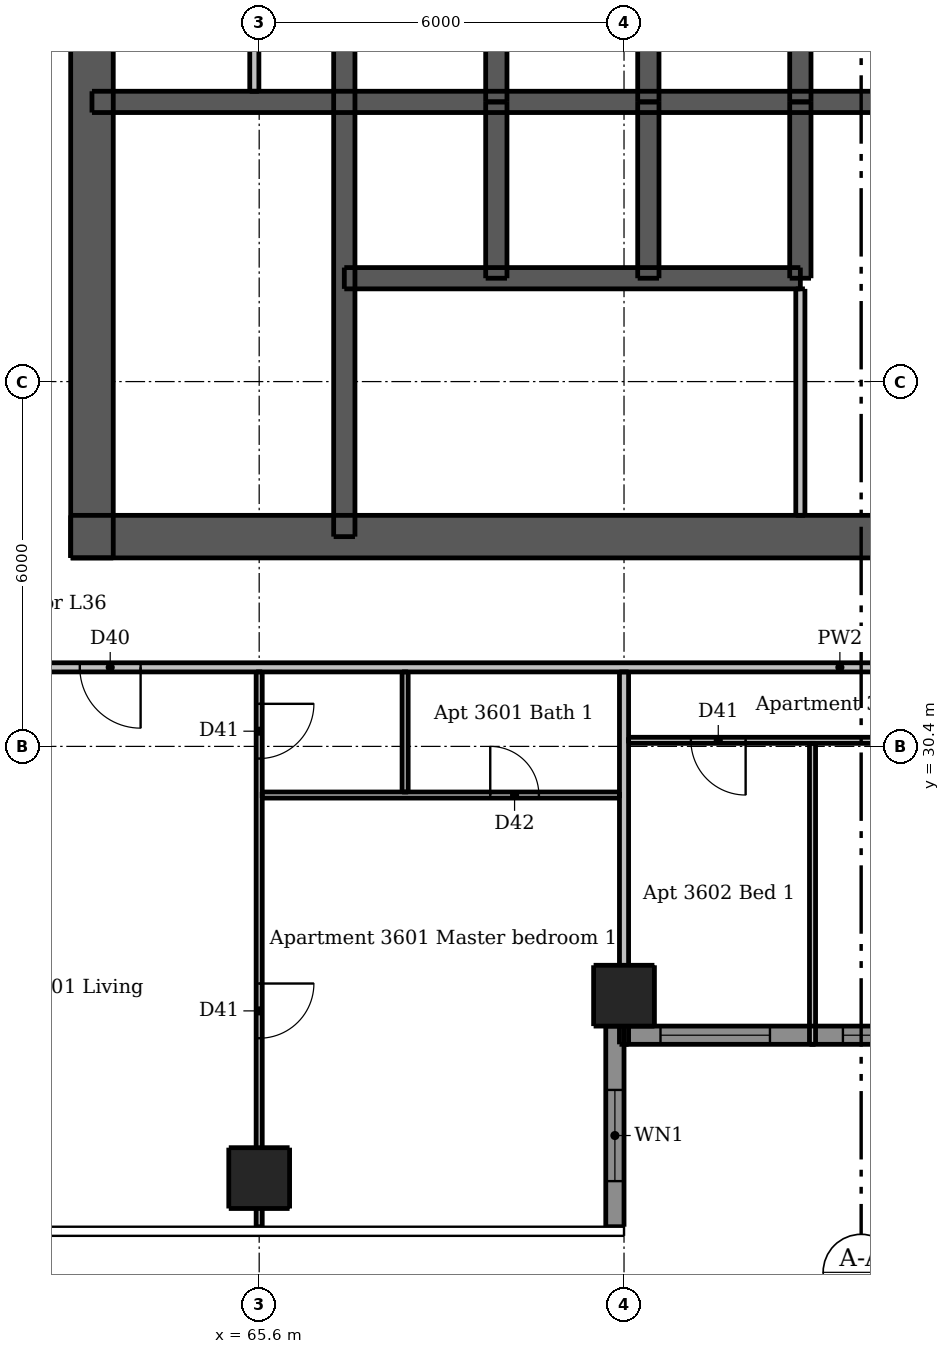
"""IFC4 building model, lengths in metres.
Left out: names, types, materials, properties, quantities, classifications, styles, units other than length and angle.
Written with IfcOpenShell. Run it as: python <this file> out.ifc"""

import sys

from ifc_helpers import new_model, si_unit, direction, frame, frame_2d, origin, origin_2d, place, context, subcontext, project, spatial, rectangle, extrude, element, fill, save


model = new_model("IFC4")
c1 = context("Model", 3, precision=1e-05, world=origin(), true_north=direction((0.0, 1.0)))
c2 = subcontext(c1, "Body", "Model", "MODEL_VIEW")
j1 = project(units=[si_unit("LENGTHUNIT", "METRE"), si_unit("PLANEANGLEUNIT", "RADIAN")], contexts=[c1])
p1 = place(None, origin())
s1 = spatial("IfcSite", under=j1, at=p1, CompositionType="ELEMENT")
p2 = place(p1, origin())
s2 = spatial("IfcBuilding", under=s1, at=p2, CompositionType="ELEMENT")
p3 = place(p2, frame((0.0, 0.0, 137.2)))
s3 = spatial("IfcBuildingStorey", under=s2, at=p3, CompositionType="ELEMENT", Elevation=137.2)
p4 = place(p3, frame((62.5, 33.85, 0.0), z_axis=(0.0, 0.0, 1.0), x_axis=(1.0, 0.0, 0.0)))
e1 = element("IfcWall", 1, at=p4, inside=s3, PredefinedType="SHEAR", context=c2, shape_type="SweptSolid", body=[
    extrude(rectangle(XDim=24.0, YDim=0.7, at=frame_2d((12.0, 0.0))), origin(), (0.0, 0.0, 1.0), 3.05),
])
p5 = place(p4, frame((1.962, 0.0, 0.0)))
e2 = element("IfcOpeningElement", 2, at=p5, cuts=e1, PredefinedType="OPENING", context=c2, shape_type="SweptSolid", body=[
    extrude(rectangle(XDim=1.1, YDim=2.1, at=frame_2d((0.55, 1.05))), frame((0.0, 0.36, 0.0), z_axis=(0.0, -1.0, 0.0), x_axis=(1.0, 0.0, 0.0)), (0.0, 0.0, 1.0), 0.72),
])
p6 = place(p4, frame((20.938, 0.0, 0.0)))
e3 = element("IfcOpeningElement", 3, at=p6, cuts=e1, PredefinedType="OPENING", context=c2, shape_type="SweptSolid", body=[
    extrude(rectangle(XDim=1.1, YDim=2.1, at=frame_2d((0.55, 1.05))), frame((0.0, 0.36, 0.0), z_axis=(0.0, -1.0, 0.0), x_axis=(1.0, 0.0, 0.0)), (0.0, 0.0, 1.0), 0.72),
])
p7 = place(p4, frame((8.0, 0.0, 0.0)))
e4 = element("IfcOpeningElement", 4, at=p7, cuts=e1, PredefinedType="OPENING", context=c2, shape_type="SweptSolid", body=[
    extrude(rectangle(XDim=1.1, YDim=2.1, at=frame_2d((0.55, 1.05))), frame((0.0, 0.36, 0.0), z_axis=(0.0, -1.0, 0.0), x_axis=(1.0, 0.0, 0.0)), (0.0, 0.0, 1.0), 0.72),
])
p8 = place(p4, frame((15.3, 0.0, 0.0)))
e5 = element("IfcOpeningElement", 5, at=p8, cuts=e1, PredefinedType="OPENING", context=c2, shape_type="SweptSolid", body=[
    extrude(rectangle(XDim=0.9, YDim=2.1, at=frame_2d((0.45, 1.05))), frame((0.0, 0.36, 0.0), z_axis=(0.0, -1.0, 0.0), x_axis=(1.0, 0.0, 0.0)), (0.0, 0.0, 1.0), 0.72),
])
p9 = place(p3, frame((62.85, 33.5, 0.0), z_axis=(0.0, 0.0, 1.0), x_axis=(0.0, 1.0, 0.0)))
e6 = element("IfcWall", 6, at=p9, inside=s3, PredefinedType="SHEAR", context=c2, shape_type="SweptSolid", body=[
    extrude(rectangle(XDim=24.0, YDim=0.7, at=frame_2d((12.0, 0.0))), origin(), (0.0, 0.0, 1.0), 3.05),
])
p10 = place(p9, frame((11.2, 0.0, 0.0)))
e7 = element("IfcOpeningElement", 7, at=p10, cuts=e6, PredefinedType="OPENING", context=c2, shape_type="SweptSolid", body=[
    extrude(rectangle(XDim=1.6, YDim=2.1, at=frame_2d((0.8, 1.05))), frame((0.0, 0.36, 0.0), z_axis=(0.0, -1.0, 0.0), x_axis=(1.0, 0.0, 0.0)), (0.0, 0.0, 1.0), 0.72),
])
p11 = place(p3, frame((62.85, 41.0, 0.0), z_axis=(0.0, 0.0, 1.0), x_axis=(1.0, 0.0, 0.0)))
e8 = element("IfcWall", 8, at=p11, inside=s3, PredefinedType="SHEAR", context=c2, shape_type="SweptSolid", body=[
    extrude(rectangle(XDim=23.3, YDim=0.35, at=frame_2d((11.65, 0.0))), origin(), (0.0, 0.0, 1.0), 3.05),
])
p12 = place(p3, frame((67.0, 33.85, 0.0), z_axis=(0.0, 0.0, 1.0), x_axis=(0.0, 1.0, 0.0)))
e9 = element("IfcWall", 9, at=p12, inside=s3, PredefinedType="SHEAR", context=c2, shape_type="SweptSolid", body=[
    extrude(rectangle(XDim=10.05, YDim=0.35, at=frame_2d((5.025, 0.0))), origin(), (0.0, 0.0, 1.0), 3.05),
])
p13 = place(p12, frame((0.55, 0.0, 0.0)))
e10 = element("IfcOpeningElement", 10, at=p13, cuts=e9, PredefinedType="OPENING", context=c2, shape_type="SweptSolid", body=[
    extrude(rectangle(XDim=1.1, YDim=2.1, at=frame_2d((0.55, 1.05))), frame((0.0, 0.185, 0.0), z_axis=(0.0, -1.0, 0.0), x_axis=(1.0, 0.0, 0.0)), (0.0, 0.0, 1.0), 0.37),
])
for number, where, z_axis, x_axis in (
    (11, (69.5, 41.0, 0.0), (0.0, 0.0, 1.0), (0.0, 1.0, 0.0)),
    (12, (72.0, 41.0, 0.0), (0.0, 0.0, 1.0), (0.0, 1.0, 0.0)),
    (13, (74.5, 41.0, 0.0), (0.0, 0.0, 1.0), (0.0, 1.0, 0.0)),
):
    element("IfcWall", number, at=place(p3, frame(where, z_axis=z_axis, x_axis=x_axis)), inside=s3, PredefinedType="SHEAR", context=c2, shape_type="SweptSolid", body=[
        extrude(rectangle(XDim=2.9, YDim=0.35, at=frame_2d((1.45, 0.0))), origin(), (0.0, 0.0, 1.0), 3.05),
    ])
p14 = place(p3, frame((67.0, 38.1, 0.0), z_axis=(0.0, 0.0, 1.0), x_axis=(1.0, 0.0, 0.0)))
e14 = element("IfcWall", 14, at=p14, inside=s3, PredefinedType="SHEAR", context=c2, shape_type="SweptSolid", body=[
    extrude(rectangle(XDim=7.5, YDim=0.35, at=frame_2d((3.75, 0.0))), origin(), (0.0, 0.0, 1.0), 3.05),
])
p15 = place(p14, frame((0.7, 0.0, 0.0)))
e15 = element("IfcOpeningElement", 15, at=p15, cuts=e14, PredefinedType="OPENING", context=c2, shape_type="SweptSolid", body=[
    extrude(rectangle(XDim=1.1, YDim=2.1, at=frame_2d((0.55, 1.05))), frame((0.0, 0.185, 0.0), z_axis=(0.0, -1.0, 0.0), x_axis=(1.0, 0.0, 0.0)), (0.0, 0.0, 1.0), 0.37),
])
p16 = place(p14, frame((3.2, 0.0, 0.0)))
e16 = element("IfcOpeningElement", 16, at=p16, cuts=e14, PredefinedType="OPENING", context=c2, shape_type="SweptSolid", body=[
    extrude(rectangle(XDim=1.1, YDim=2.1, at=frame_2d((0.55, 1.05))), frame((0.0, 0.185, 0.0), z_axis=(0.0, -1.0, 0.0), x_axis=(1.0, 0.0, 0.0)), (0.0, 0.0, 1.0), 0.37),
])
p17 = place(p14, frame((5.65, 0.0, 0.0)))
e17 = element("IfcOpeningElement", 17, at=p17, cuts=e14, PredefinedType="OPENING", context=c2, shape_type="SweptSolid", body=[
    extrude(rectangle(XDim=1.2, YDim=2.1, at=frame_2d((0.6, 1.05))), frame((0.0, 0.185, 0.0), z_axis=(0.0, -1.0, 0.0), x_axis=(1.0, 0.0, 0.0)), (0.0, 0.0, 1.0), 0.37),
])
for number, where, z_axis, x_axis in (
    (18, (69.5, 38.1, 0.0), (0.0, 0.0, 1.0), (0.0, 1.0, 0.0)),
    (19, (72.0, 38.1, 0.0), (0.0, 0.0, 1.0), (0.0, 1.0, 0.0)),
    (20, (74.5, 38.1, 0.0), (0.0, 0.0, 1.0), (0.0, 1.0, 0.0)),
):
    element("IfcWall", number, at=place(p3, frame(where, z_axis=z_axis, x_axis=x_axis)), inside=s3, PredefinedType="SHEAR", context=c2, shape_type="SweptSolid", body=[
        extrude(rectangle(XDim=2.9, YDim=0.35, at=frame_2d((1.45, 0.0))), origin(), (0.0, 0.0, 1.0), 3.05),
    ])
for number, where, z_axis, x_axis in (
    (21, (65.6, 23.3, 0.0), (0.0, 0.0, 1.0), (1.0, 0.0, 0.0)),
    (22, (71.6, 26.3, 0.0), (0.0, 0.0, 1.0), (1.0, 0.0, 0.0)),
):
    element("IfcColumn", number, at=place(p3, frame(where, z_axis=z_axis, x_axis=x_axis)), inside=s3, PredefinedType="COLUMN", context=c2, shape_type="SweptSolid", body=[
        extrude(rectangle(XDim=1.0, YDim=1.0, at=origin_2d()), origin(), (0.0, 0.0, 1.0), 3.05),
    ])
p18 = place(p3, frame((71.45, 22.5, 0.0), z_axis=(0.0, 0.0, 1.0), x_axis=(0.0, 1.0, 0.0)))
e23 = element("IfcWall", 23, at=p18, inside=s3, PredefinedType="SOLIDWALL", context=c2, shape_type="SweptSolid", body=[
    extrude(rectangle(XDim=3.3, YDim=0.3, at=frame_2d((1.65, 0.0))), origin(), (0.0, 0.0, 1.0), 3.05),
])
p19 = place(p18, frame((0.75, 0.0, 0.9)))
e24 = element("IfcOpeningElement", 24, at=p19, cuts=e23, PredefinedType="OPENING", context=c2, shape_type="SweptSolid", body=[
    extrude(rectangle(XDim=1.5, YDim=1.5, at=frame_2d((0.75, 0.75))), frame((0.0, 0.16, 0.0), z_axis=(0.0, -1.0, 0.0), x_axis=(1.0, 0.0, 0.0)), (0.0, 0.0, 1.0), 0.32),
])
p20 = place(p3, frame((71.6, 25.65, 0.0), z_axis=(0.0, 0.0, 1.0), x_axis=(1.0, 0.0, 0.0)))
e25 = element("IfcWall", 25, at=p20, inside=s3, PredefinedType="SOLIDWALL", context=c2, shape_type="SweptSolid", body=[
    extrude(rectangle(XDim=6.0, YDim=0.3, at=frame_2d((3.0, 0.0))), origin(), (0.0, 0.0, 1.0), 3.05),
])
p21 = place(p20, frame((0.6, 0.0, 0.15)))
e26 = element("IfcOpeningElement", 26, at=p21, cuts=e25, PredefinedType="OPENING", context=c2, shape_type="SweptSolid", body=[
    extrude(rectangle(XDim=1.8, YDim=2.1, at=frame_2d((0.9, 1.05))), frame((0.0, 0.16, 0.0), z_axis=(0.0, -1.0, 0.0), x_axis=(1.0, 0.0, 0.0)), (0.0, 0.0, 1.0), 0.32),
])
p22 = place(p20, frame((3.6, 0.0, 0.15)))
e27 = element("IfcOpeningElement", 27, at=p22, cuts=e25, PredefinedType="OPENING", context=c2, shape_type="SweptSolid", body=[
    extrude(rectangle(XDim=1.8, YDim=2.1, at=frame_2d((0.9, 1.05))), frame((0.0, 0.16, 0.0), z_axis=(0.0, -1.0, 0.0), x_axis=(1.0, 0.0, 0.0)), (0.0, 0.0, 1.0), 0.32),
])
p23 = place(p3, frame((74.5, 34.2, 0.0), z_axis=(0.0, 0.0, 1.0), x_axis=(0.0, 1.0, 0.0)))
e28 = element("IfcWall", 28, at=p23, inside=s3, PredefinedType="PLUMBINGWALL", context=c2, shape_type="SweptSolid", body=[
    extrude(rectangle(XDim=3.725, YDim=0.15, at=frame_2d((1.863, 0.0))), origin(), (0.0, 0.0, 1.0), 3.05),
])
p24 = place(p3, frame((65.52, 41.175, 0.0), z_axis=(0.0, 0.0, 1.0), x_axis=(0.0, 1.0, 0.0)))
e29 = element("IfcWall", 29, at=p24, inside=s3, PredefinedType="PLUMBINGWALL", context=c2, shape_type="SweptSolid", body=[
    extrude(rectangle(XDim=2.55, YDim=0.15, at=frame_2d((1.275, 0.0))), origin(), (0.0, 0.0, 1.0), 3.05),
])
p25 = place(p3, frame((65.6, 31.625, 0.0), z_axis=(0.0, 0.0, 1.0), x_axis=(0.0, -1.0, 0.0)))
e30 = element("IfcWall", 30, at=p25, inside=s3, PredefinedType="PARTITIONING", context=c2, shape_type="SweptSolid", body=[
    extrude(rectangle(XDim=9.125, YDim=0.1, at=frame_2d((4.562, 0.0))), origin(), (0.0, 0.0, 1.0), 2.516),
])
p26 = place(p25, frame((0.525, 0.0, 0.0)))
e31 = element("IfcOpeningElement", 31, at=p26, cuts=e30, PredefinedType="OPENING", context=c2, shape_type="SweptSolid", body=[
    extrude(rectangle(XDim=0.9, YDim=2.1, at=frame_2d((0.45, 1.05))), frame((0.0, 0.06, 0.0), z_axis=(0.0, -1.0, 0.0), x_axis=(1.0, 0.0, 0.0)), (0.0, 0.0, 1.0), 0.12),
])
p27 = place(p25, frame((5.125, 0.0, 0.0)))
e32 = element("IfcOpeningElement", 32, at=p27, cuts=e30, PredefinedType="OPENING", context=c2, shape_type="SweptSolid", body=[
    extrude(rectangle(XDim=0.9, YDim=2.1, at=frame_2d((0.45, 1.05))), frame((0.0, 0.06, 0.0), z_axis=(0.0, -1.0, 0.0), x_axis=(1.0, 0.0, 0.0)), (0.0, 0.0, 1.0), 0.12),
])
p28 = place(p3, frame((68.0, 29.65, 0.0), z_axis=(0.0, 0.0, 1.0), x_axis=(0.0, 1.0, 0.0)))
e33 = element("IfcWall", 33, at=p28, inside=s3, PredefinedType="PARTITIONING", context=c2, shape_type="SweptSolid", body=[
    extrude(rectangle(XDim=1.975, YDim=0.1, at=frame_2d((0.988, 0.0))), origin(), (0.0, 0.0, 1.0), 3.05),
])
p29 = place(p3, frame((74.7, 25.5, 0.0), z_axis=(0.0, 0.0, 1.0), x_axis=(0.0, 1.0, 0.0)))
e34 = element("IfcWall", 34, at=p29, inside=s3, PredefinedType="PARTITIONING", context=c2, shape_type="SweptSolid", body=[
    extrude(rectangle(XDim=4.95, YDim=0.1, at=frame_2d((2.475, 0.0))), origin(), (0.0, 0.0, 1.0), 3.05),
])
p30 = place(p3, frame((88.25, 30.5, 0.0), z_axis=(0.0, 0.0, 1.0), x_axis=(-1.0, 0.0, 0.0)))
e35 = element("IfcWall", 35, at=p30, inside=s3, PredefinedType="PARTITIONING", context=c2, shape_type="SweptSolid", body=[
    extrude(rectangle(XDim=16.575, YDim=0.1, at=frame_2d((8.288, 0.0))), origin(), (0.0, 0.0, 1.0), 3.05),
])
p31 = place(p30, frame((4.2, 0.0, 0.0)))
e36 = element("IfcOpeningElement", 36, at=p31, cuts=e35, PredefinedType="OPENING", context=c2, shape_type="SweptSolid", body=[
    extrude(rectangle(XDim=0.9, YDim=2.1, at=frame_2d((0.45, 1.05))), frame((0.0, 0.06, 0.0), z_axis=(0.0, -1.0, 0.0), x_axis=(1.0, 0.0, 0.0)), (0.0, 0.0, 1.0), 0.12),
])
p32 = place(p30, frame((0.35, 0.0, 0.0)))
e37 = element("IfcOpeningElement", 37, at=p32, cuts=e35, PredefinedType="OPENING", context=c2, shape_type="SweptSolid", body=[
    extrude(rectangle(XDim=0.9, YDim=2.1, at=frame_2d((0.45, 1.05))), frame((0.0, 0.06, 0.0), z_axis=(0.0, -1.0, 0.0), x_axis=(1.0, 0.0, 0.0)), (0.0, 0.0, 1.0), 0.12),
])
p33 = place(p30, frame((14.65, 0.0, 0.0)))
e38 = element("IfcOpeningElement", 38, at=p33, cuts=e35, PredefinedType="OPENING", context=c2, shape_type="SweptSolid", body=[
    extrude(rectangle(XDim=0.9, YDim=2.1, at=frame_2d((0.45, 1.05))), frame((0.0, 0.06, 0.0), z_axis=(0.0, -1.0, 0.0), x_axis=(1.0, 0.0, 0.0)), (0.0, 0.0, 1.0), 0.12),
])
p34 = place(p30, frame((11.35, 0.0, 0.0)))
e39 = element("IfcOpeningElement", 39, at=p34, cuts=e35, PredefinedType="OPENING", context=c2, shape_type="SweptSolid", body=[
    extrude(rectangle(XDim=0.9, YDim=2.1, at=frame_2d((0.45, 1.05))), frame((0.0, 0.06, 0.0), z_axis=(0.0, -1.0, 0.0), x_axis=(1.0, 0.0, 0.0)), (0.0, 0.0, 1.0), 0.12),
])
p35 = place(p30, frame((8.45, 0.0, 0.0)))
e40 = element("IfcOpeningElement", 40, at=p35, cuts=e35, PredefinedType="OPENING", context=c2, shape_type="SweptSolid", body=[
    extrude(rectangle(XDim=0.8, YDim=2.1, at=frame_2d((0.4, 1.05))), frame((0.0, 0.06, 0.0), z_axis=(0.0, -1.0, 0.0), x_axis=(1.0, 0.0, 0.0)), (0.0, 0.0, 1.0), 0.12),
])
p36 = place(p3, frame((65.65, 29.6, 0.0), z_axis=(0.0, 0.0, 1.0), x_axis=(1.0, 0.0, 0.0)))
e41 = element("IfcWall", 41, at=p36, inside=s3, PredefinedType="PARTITIONING", context=c2, shape_type="SweptSolid", body=[
    extrude(rectangle(XDim=5.875, YDim=0.1, at=frame_2d((2.938, 0.0))), origin(), (0.0, 0.0, 1.0), 3.05),
])
p37 = place(p36, frame((3.75, 0.0, 0.0)))
e42 = element("IfcOpeningElement", 42, at=p37, cuts=e41, PredefinedType="OPENING", context=c2, shape_type="SweptSolid", body=[
    extrude(rectangle(XDim=0.8, YDim=2.1, at=frame_2d((0.4, 1.05))), frame((0.0, 0.06, 0.0), z_axis=(0.0, -1.0, 0.0), x_axis=(1.0, 0.0, 0.0)), (0.0, 0.0, 1.0), 0.12),
])
p38 = place(p3, frame((71.6, 25.5, 0.0), z_axis=(0.0, 0.0, 1.0), x_axis=(0.0, 1.0, 0.0)))
e43 = element("IfcWall", 43, at=p38, inside=s3, PredefinedType="PARTITIONING", context=c2, shape_type="SweptSolid", body=[
    extrude(rectangle(XDim=6.125, YDim=0.15, at=frame_2d((3.062, 0.0))), origin(), (0.0, 0.0, 1.0), 2.59),
])
p39 = place(p3, frame((89.525, 31.7, 0.0), z_axis=(0.0, 0.0, 1.0), x_axis=(-1.0, 0.0, 0.0)))
e44 = element("IfcWall", 44, at=p39, inside=s3, PredefinedType="PARTITIONING", context=c2, shape_type="SweptSolid", body=[
    extrude(rectangle(XDim=28.75, YDim=0.15, at=frame_2d((14.375, 0.0))), origin(), (0.0, 0.0, 1.0), 3.05),
])
p40 = place(p39, frame((25.875, 0.0, 0.0)))
e45 = element("IfcOpeningElement", 45, at=p40, cuts=e44, PredefinedType="OPENING", context=c2, shape_type="SweptSolid", body=[
    extrude(rectangle(XDim=1.0, YDim=2.1, at=frame_2d((0.5, 1.05))), frame((0.0, 0.085, 0.0), z_axis=(0.0, -1.0, 0.0), x_axis=(1.0, 0.0, 0.0)), (0.0, 0.0, 1.0), 0.17),
])
p41 = place(p39, frame((9.075, 0.0, 0.0)))
e46 = element("IfcOpeningElement", 46, at=p41, cuts=e44, PredefinedType="OPENING", context=c2, shape_type="SweptSolid", body=[
    extrude(rectangle(XDim=1.0, YDim=2.1, at=frame_2d((0.5, 1.05))), frame((0.0, 0.085, 0.0), z_axis=(0.0, -1.0, 0.0), x_axis=(1.0, 0.0, 0.0)), (0.0, 0.0, 1.0), 0.17),
])
p42 = place(p19, origin())
e47 = element("IfcWindow", 47, at=p42, inside=s3, PartitioningType="DOUBLE_PANEL_VERTICAL", PredefinedType="WINDOW", context=c2, shape_type="SweptSolid", body=[
    extrude(rectangle(XDim=1.5, YDim=1.5, at=frame_2d((0.75, 0.75))), frame((0.0, 0.03, 0.0), z_axis=(0.0, -1.0, 0.0), x_axis=(1.0, 0.0, 0.0)), (0.0, 0.0, 1.0), 0.06),
])
fill(e24, e47)
p43 = place(p21, origin())
e48 = element("IfcWindow", 48, at=p43, inside=s3, PartitioningType="DOUBLE_PANEL_VERTICAL", PredefinedType="WINDOW", context=c2, shape_type="SweptSolid", body=[
    extrude(rectangle(XDim=1.8, YDim=2.1, at=frame_2d((0.9, 1.05))), frame((0.0, 0.03, 0.0), z_axis=(0.0, -1.0, 0.0), x_axis=(1.0, 0.0, 0.0)), (0.0, 0.0, 1.0), 0.06),
])
fill(e26, e48)
p44 = place(p22, origin())
e49 = element("IfcWindow", 49, at=p44, inside=s3, PartitioningType="DOUBLE_PANEL_VERTICAL", PredefinedType="WINDOW", context=c2, shape_type="SweptSolid", body=[
    extrude(rectangle(XDim=1.8, YDim=2.1, at=frame_2d((0.9, 1.05))), frame((0.0, 0.03, 0.0), z_axis=(0.0, -1.0, 0.0), x_axis=(1.0, 0.0, 0.0)), (0.0, 0.0, 1.0), 0.06),
])
fill(e27, e49)
p45 = place(p5, origin())
e50 = element("IfcDoor", 50, at=p45, inside=s3, OperationType="SINGLE_SWING_LEFT", PredefinedType="DOOR", context=c2, shape_type="SweptSolid", body=[
    extrude(rectangle(XDim=1.1, YDim=2.1, at=frame_2d((0.55, 1.05))), frame((0.0, 0.337, 0.0), z_axis=(0.0, -1.0, 0.0), x_axis=(1.0, 0.0, 0.0)), (0.0, 0.0, 1.0), 0.05),
])
fill(e2, e50)
p46 = place(p7, origin())
e51 = element("IfcDoor", 51, at=p46, inside=s3, OperationType="SINGLE_SWING_LEFT", PredefinedType="DOOR", context=c2, shape_type="SweptSolid", body=[
    extrude(rectangle(XDim=1.1, YDim=2.1, at=frame_2d((0.55, 1.05))), frame((0.0, 0.337, 0.0), z_axis=(0.0, -1.0, 0.0), x_axis=(1.0, 0.0, 0.0)), (0.0, 0.0, 1.0), 0.05),
])
fill(e4, e51)
p47 = place(p13, origin())
e52 = element("IfcDoor", 52, at=p47, inside=s3, OperationType="SINGLE_SWING_RIGHT", PredefinedType="DOOR", context=c2, shape_type="SweptSolid", body=[
    extrude(rectangle(XDim=1.1, YDim=2.1, at=frame_2d((0.55, 1.05))), frame((0.0, -0.112, 0.0), z_axis=(0.0, -1.0, 0.0), x_axis=(1.0, 0.0, 0.0)), (0.0, 0.0, 1.0), 0.05),
])
fill(e10, e52)
p48 = place(p15, origin())
e53 = element("IfcDoor", 53, at=p48, inside=s3, OperationType="DOUBLE_DOOR_SLIDING", PredefinedType="DOOR", context=c2, shape_type="SweptSolid", body=[
    extrude(rectangle(XDim=1.1, YDim=2.1, at=frame_2d((0.55, 1.05))), frame((0.0, 0.025, 0.0), z_axis=(0.0, -1.0, 0.0), x_axis=(1.0, 0.0, 0.0)), (0.0, 0.0, 1.0), 0.05),
])
fill(e15, e53)
p49 = place(p16, origin())
e54 = element("IfcDoor", 54, at=p49, inside=s3, OperationType="DOUBLE_DOOR_SLIDING", PredefinedType="DOOR", context=c2, shape_type="SweptSolid", body=[
    extrude(rectangle(XDim=1.1, YDim=2.1, at=frame_2d((0.55, 1.05))), frame((0.0, 0.025, 0.0), z_axis=(0.0, -1.0, 0.0), x_axis=(1.0, 0.0, 0.0)), (0.0, 0.0, 1.0), 0.05),
])
fill(e16, e54)
p50 = place(p17, origin())
e55 = element("IfcDoor", 55, at=p50, inside=s3, OperationType="DOUBLE_DOOR_SLIDING", PredefinedType="DOOR", context=c2, shape_type="SweptSolid", body=[
    extrude(rectangle(XDim=1.2, YDim=2.1, at=frame_2d((0.6, 1.05))), frame((0.0, 0.025, 0.0), z_axis=(0.0, -1.0, 0.0), x_axis=(1.0, 0.0, 0.0)), (0.0, 0.0, 1.0), 0.05),
])
fill(e17, e55)
p51 = place(p40, origin())
e56 = element("IfcDoor", 56, at=p51, inside=s3, OperationType="SINGLE_SWING_LEFT", PredefinedType="DOOR", context=c2, shape_type="SweptSolid", body=[
    extrude(rectangle(XDim=1.0, YDim=2.1, at=frame_2d((0.5, 1.05))), frame((0.0, 0.025, 0.0), z_axis=(0.0, -1.0, 0.0), x_axis=(1.0, 0.0, 0.0)), (0.0, 0.0, 1.0), 0.05),
])
fill(e45, e56)
p52 = place(p26, origin())
e57 = element("IfcDoor", 57, at=p52, inside=s3, OperationType="SINGLE_SWING_LEFT", PredefinedType="DOOR", context=c2, shape_type="SweptSolid", body=[
    extrude(rectangle(XDim=0.9, YDim=2.1, at=frame_2d((0.45, 1.05))), frame((0.0, 0.025, 0.0), z_axis=(0.0, -1.0, 0.0), x_axis=(1.0, 0.0, 0.0)), (0.0, 0.0, 1.0), 0.05),
])
fill(e31, e57)
p53 = place(p27, origin())
e58 = element("IfcDoor", 58, at=p53, inside=s3, OperationType="SINGLE_SWING_LEFT", PredefinedType="DOOR", context=c2, shape_type="SweptSolid", body=[
    extrude(rectangle(XDim=0.9, YDim=2.1, at=frame_2d((0.45, 1.05))), frame((0.0, 0.025, 0.0), z_axis=(0.0, -1.0, 0.0), x_axis=(1.0, 0.0, 0.0)), (0.0, 0.0, 1.0), 0.05),
])
fill(e32, e58)
p54 = place(p37, origin())
e59 = element("IfcDoor", 59, at=p54, inside=s3, OperationType="SINGLE_SWING_LEFT", PredefinedType="DOOR", context=c2, shape_type="SweptSolid", body=[
    extrude(rectangle(XDim=0.8, YDim=2.1, at=frame_2d((0.4, 1.05))), frame((0.0, 0.025, 0.0), z_axis=(0.0, -1.0, 0.0), x_axis=(1.0, 0.0, 0.0)), (0.0, 0.0, 1.0), 0.05),
])
fill(e42, e59)
p55 = place(p33, origin())
e60 = element("IfcDoor", 60, at=p55, inside=s3, OperationType="SINGLE_SWING_LEFT", PredefinedType="DOOR", context=c2, shape_type="SweptSolid", body=[
    extrude(rectangle(XDim=0.9, YDim=2.1, at=frame_2d((0.45, 1.05))), frame((0.0, 0.025, 0.0), z_axis=(0.0, -1.0, 0.0), x_axis=(1.0, 0.0, 0.0)), (0.0, 0.0, 1.0), 0.05),
])
fill(e38, e60)
save(model, sys.argv[1])
